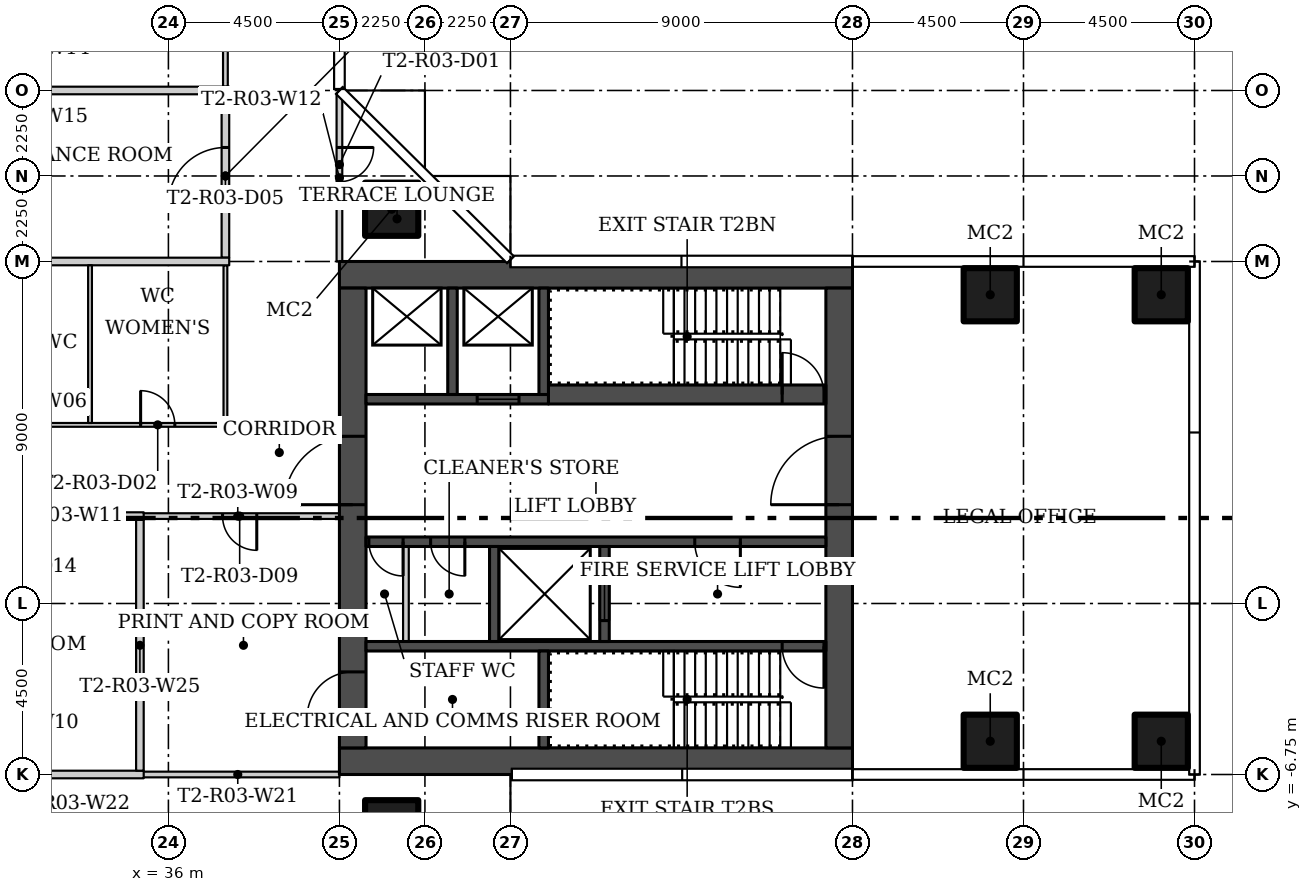
"""IFC4 building model, lengths in metres.
Left out: names, types, materials, properties, quantities, classifications, styles, units other than length and angle.
Written with IfcOpenShell. Run it as: python <this file> out.ifc"""

import sys

from ifc_helpers import new_model, si_unit, direction, frame, frame_2d, origin, origin_2d, place, context, subcontext, project, spatial, rectangle, hollow_rectangle, extrude, element, fill, save


model = new_model("IFC4")
c1 = context("Model", 3, precision=1e-05, world=origin(), true_north=direction((0.0, 1.0)))
c2 = subcontext(c1, "Body", "Model", "MODEL_VIEW")
j1 = project(units=[si_unit("LENGTHUNIT", "METRE"), si_unit("PLANEANGLEUNIT", "RADIAN")], contexts=[c1])
p1 = place(None, origin())
s1 = spatial("IfcSite", under=j1, at=p1, CompositionType="ELEMENT")
p2 = place(p1, origin())
s2 = spatial("IfcBuilding", under=s1, at=p2, CompositionType="ELEMENT")
p3 = place(p2, frame((0.0, 0.0, 42.0)))
s3 = spatial("IfcBuildingStorey", under=s2, at=p3, CompositionType="ELEMENT", Elevation=42.0)
for number, where in (
    (1, (41.875, 8.125, 0.0)),
    (2, (41.875, -8.125, 0.0)),
    (3, (57.625, -5.875, 0.0)),
    (4, (62.125, -5.875, 0.0)),
    (5, (57.625, 5.875, 0.0)),
    (6, (62.125, 5.875, 0.0)),
):
    element("IfcColumn", number, at=place(p3, frame(where)), inside=s3, PredefinedType="COLUMN", context=c2, shape_type="SweptSolid", body=[
        extrude(hollow_rectangle(XDim=1.4, YDim=1.4, WallThickness=0.05, at=origin_2d()), origin(), (0.0, 0.0, 1.0), 3.55),
    ])
p4 = place(p3, frame((37.5, 6.85, 0.0), z_axis=(0.0, 0.0, 1.0), x_axis=(0.0, 1.0, 0.0)))
e7 = element("IfcWall", 7, at=p4, inside=s3, PredefinedType="PARTITIONING", context=c2, shape_type="SweptSolid", body=[
    extrude(rectangle(XDim=4.3, YDim=0.2, at=frame_2d((2.15, 0.0))), origin(), (0.0, 0.0, 1.0), 3.55),
])
p5 = place(p4, frame((1.4, 0.0, 0.0)))
e8 = element("IfcOpeningElement", 8, at=p5, cuts=e7, PredefinedType="OPENING", context=c2, shape_type="SweptSolid", body=[
    extrude(rectangle(XDim=1.5, YDim=2.1, at=frame_2d((0.75, 1.05))), frame((0.0, 0.11, 0.0), z_axis=(0.0, -1.0, 0.0), x_axis=(1.0, 0.0, 0.0)), (0.0, 0.0, 1.0), 0.22),
])
p6 = place(p3, frame((37.5, 11.35, 0.0), z_axis=(0.0, 0.0, 1.0), x_axis=(0.0, 1.0, 0.0)))
e9 = element("IfcWall", 9, at=p6, inside=s3, PredefinedType="PARTITIONING", context=c2, shape_type="SweptSolid", body=[
    extrude(rectangle(XDim=4.325, YDim=0.125, at=frame_2d((2.163, 0.0))), origin(), (0.0, 0.0, 1.0), 3.55),
])
p7 = place(p6, frame((1.7, 0.0, 0.0)))
e10 = element("IfcOpeningElement", 10, at=p7, cuts=e9, PredefinedType="OPENING", context=c2, shape_type="SweptSolid", body=[
    extrude(rectangle(XDim=0.9, YDim=2.1, at=frame_2d((0.45, 1.05))), frame((0.0, 0.073, 0.0), z_axis=(0.0, -1.0, 0.0), x_axis=(1.0, 0.0, 0.0)), (0.0, 0.0, 1.0), 0.145),
])
p8 = place(p3, frame((37.5, 2.5, 0.0), z_axis=(0.0, 0.0, 1.0), x_axis=(0.0, 1.0, 0.0)))
e11 = element("IfcWall", 11, at=p8, inside=s3, PredefinedType="PARTITIONING", context=c2, shape_type="SweptSolid", body=[
    extrude(rectangle(XDim=4.15, YDim=0.1, at=frame_2d((2.075, 0.0))), origin(), (0.0, 0.0, 1.0), 3.55),
])
p9 = place(p3, frame((27.0, 2.45, 0.0)))
e12 = element("IfcWall", 12, at=p9, inside=s3, PredefinedType="PARTITIONING", context=c2, shape_type="SweptSolid", body=[
    extrude(rectangle(XDim=10.55, YDim=0.1, at=frame_2d((5.275, 0.0))), origin(), (0.0, 0.0, 1.0), 3.55),
])
p10 = place(p9, frame((8.269, 0.0, 0.0)))
e13 = element("IfcOpeningElement", 13, at=p10, cuts=e12, PredefinedType="OPENING", context=c2, shape_type="SweptSolid", body=[
    extrude(rectangle(XDim=0.9, YDim=2.1, at=frame_2d((0.45, 1.05))), frame((0.0, 0.06, 0.0), z_axis=(0.0, -1.0, 0.0), x_axis=(1.0, 0.0, 0.0)), (0.0, 0.0, 1.0), 0.12),
])
p11 = place(p9, frame((4.706, 0.0, 0.0)))
e14 = element("IfcOpeningElement", 14, at=p11, cuts=e12, PredefinedType="OPENING", context=c2, shape_type="SweptSolid", body=[
    extrude(rectangle(XDim=0.9, YDim=2.1, at=frame_2d((0.45, 1.05))), frame((0.0, 0.06, 0.0), z_axis=(0.0, -1.0, 0.0), x_axis=(1.0, 0.0, 0.0)), (0.0, 0.0, 1.0), 0.12),
])
p12 = place(p9, frame((1.238, 0.0, 0.0)))
e15 = element("IfcOpeningElement", 15, at=p12, cuts=e12, PredefinedType="OPENING", context=c2, shape_type="SweptSolid", body=[
    extrude(rectangle(XDim=0.9, YDim=2.1, at=frame_2d((0.45, 1.05))), frame((0.0, 0.06, 0.0), z_axis=(0.0, -1.0, 0.0), x_axis=(1.0, 0.0, 0.0)), (0.0, 0.0, 1.0), 0.12),
])
p13 = place(p3, frame((40.5, 0.05, 0.0), z_axis=(0.0, 0.0, 1.0), x_axis=(-1.0, 0.0, 0.0)))
e16 = element("IfcWall", 16, at=p13, inside=s3, PredefinedType="PARTITIONING", context=c2, shape_type="SweptSolid", body=[
    extrude(rectangle(XDim=5.35, YDim=0.15, at=frame_2d((2.675, 0.0))), origin(), (0.0, 0.0, 1.0), 3.55),
])
p14 = place(p13, frame((2.175, 0.0, 0.0)))
e17 = element("IfcOpeningElement", 17, at=p14, cuts=e16, PredefinedType="OPENING", context=c2, shape_type="SweptSolid", body=[
    extrude(rectangle(XDim=0.9, YDim=2.1, at=frame_2d((0.45, 1.05))), frame((0.0, 0.085, 0.0), z_axis=(0.0, -1.0, 0.0), x_axis=(1.0, 0.0, 0.0)), (0.0, 0.0, 1.0), 0.17),
])
p15 = place(p3, frame((35.35, 0.05, 0.0), z_axis=(0.0, 0.0, 1.0), x_axis=(-1.0, 0.0, 0.0)))
e18 = element("IfcWall", 18, at=p15, inside=s3, PredefinedType="PARTITIONING", context=c2, shape_type="SweptSolid", body=[
    extrude(rectangle(XDim=5.45, YDim=0.2, at=frame_2d((2.725, 0.0))), origin(), (0.0, 0.0, 1.0), 3.55),
])
p16 = place(p3, frame((40.5, 11.155, 0.0), z_axis=(0.0, 0.0, 1.0), x_axis=(0.0, -1.0, 0.0)))
e19 = element("IfcWall", 19, at=p16, inside=s3, PredefinedType="PARTITIONING", context=c2, shape_type="SweptSolid", body=[
    extrude(rectangle(XDim=4.405, YDim=0.15, at=frame_2d((2.203, 0.0))), origin(), (0.0, 0.0, 1.0), 3.55),
])
p17 = place(p16, frame((1.405, 0.0, 0.0)))
e20 = element("IfcOpeningElement", 20, at=p17, cuts=e19, PredefinedType="OPENING", context=c2, shape_type="SweptSolid", body=[
    extrude(rectangle(XDim=0.9, YDim=2.1, at=frame_2d((0.45, 1.05))), frame((0.0, 0.085, 0.0), z_axis=(0.0, -1.0, 0.0), x_axis=(1.0, 0.0, 0.0)), (0.0, 0.0, 1.0), 0.17),
])
p18 = place(p3, frame((37.6, 11.25, 0.0), z_axis=(0.0, 0.0, 1.0), x_axis=(-1.0, 0.0, 0.0)))
e21 = element("IfcWall", 21, at=p18, inside=s3, PredefinedType="PARTITIONING", context=c2, shape_type="SweptSolid", body=[
    extrude(rectangle(XDim=10.505, YDim=0.2, at=frame_2d((5.252, 0.0))), origin(), (0.0, 0.0, 1.0), 3.55),
])
p19 = place(p3, frame((27.0, 6.75, 0.0)))
e22 = element("IfcWall", 22, at=p19, inside=s3, PredefinedType="PARTITIONING", context=c2, shape_type="SweptSolid", body=[
    extrude(rectangle(XDim=10.6, YDim=0.2, at=frame_2d((5.3, 0.0))), origin(), (0.0, 0.0, 1.0), 3.55),
])
p20 = place(p3, frame((33.938, 6.65, 0.0), z_axis=(0.0, 0.0, 1.0), x_axis=(0.0, -1.0, 0.0)))
e23 = element("IfcWall", 23, at=p20, inside=s3, PredefinedType="PARTITIONING", context=c2, shape_type="SweptSolid", body=[
    extrude(rectangle(XDim=4.15, YDim=0.1, at=frame_2d((2.075, 0.0))), origin(), (0.0, 0.0, 1.0), 3.55),
])
p21 = place(p3, frame((40.5, -6.75, 0.0), z_axis=(0.0, 0.0, 1.0), x_axis=(-1.0, 0.0, 0.0)))
e24 = element("IfcWall", 24, at=p21, inside=s3, PredefinedType="PARTITIONING", context=c2, shape_type="SweptSolid", body=[
    extrude(rectangle(XDim=5.35, YDim=0.15, at=frame_2d((2.675, 0.0))), origin(), (0.0, 0.0, 1.0), 3.55),
])
p22 = place(p3, frame((35.35, -6.75, 0.0), z_axis=(0.0, 0.0, 1.0), x_axis=(-1.0, 0.0, 0.0)))
e25 = element("IfcWall", 25, at=p22, inside=s3, PredefinedType="PARTITIONING", context=c2, shape_type="SweptSolid", body=[
    extrude(rectangle(XDim=5.45, YDim=0.2, at=frame_2d((2.725, 0.0))), origin(), (0.0, 0.0, 1.0), 3.55),
])
p23 = place(p3, frame((35.25, -0.05, 0.0), z_axis=(0.0, 0.0, 1.0), x_axis=(0.0, -1.0, 0.0)))
e26 = element("IfcWall", 26, at=p23, inside=s3, PredefinedType="PARTITIONING", context=c2, shape_type="SweptSolid", body=[
    extrude(rectangle(XDim=6.6, YDim=0.2, at=frame_2d((3.3, 0.0))), origin(), (0.0, 0.0, 1.0), 3.55),
])
for number, where, z_axis, x_axis in (
    (27, (54.0, -6.4, 0.0), (0.0, 0.0, 1.0), (-1.0, 0.0, 0.0)),
    (28, (54.0, 6.4, 0.0), (0.0, 0.0, 1.0), (-1.0, 0.0, 0.0)),
):
    element("IfcWall", number, at=place(p3, frame(where, z_axis=z_axis, x_axis=x_axis)), inside=s3, PredefinedType="SHEAR", context=c2, shape_type="SweptSolid", body=[
        extrude(rectangle(XDim=13.5, YDim=0.7, at=frame_2d((6.75, 0.0))), origin(), (0.0, 0.0, 1.0), 3.55),
    ])
p24 = place(p3, frame((53.65, -6.05, 0.0), z_axis=(0.0, 0.0, 1.0), x_axis=(0.0, 1.0, 0.0)))
e29 = element("IfcWall", 29, at=p24, inside=s3, PredefinedType="SHEAR", context=c2, shape_type="SweptSolid", body=[
    extrude(rectangle(XDim=12.1, YDim=0.7, at=frame_2d((6.05, 0.0))), origin(), (0.0, 0.0, 1.0), 3.55),
])
p25 = place(p24, frame((6.4, 0.0, 0.0)))
e30 = element("IfcOpeningElement", 30, at=p25, cuts=e29, PredefinedType="OPENING", context=c2, shape_type="SweptSolid", body=[
    extrude(rectangle(XDim=1.8, YDim=2.4, at=frame_2d((0.9, 1.2))), frame((0.0, 0.36, 0.0), z_axis=(0.0, -1.0, 0.0), x_axis=(1.0, 0.0, 0.0)), (0.0, 0.0, 1.0), 0.72),
])
p26 = place(p3, frame((40.85, -6.05, 0.0), z_axis=(0.0, 0.0, 1.0), x_axis=(0.0, 1.0, 0.0)))
e31 = element("IfcWall", 31, at=p26, inside=s3, PredefinedType="SHEAR", context=c2, shape_type="SweptSolid", body=[
    extrude(rectangle(XDim=12.1, YDim=0.7, at=frame_2d((6.05, 0.0))), origin(), (0.0, 0.0, 1.0), 3.55),
])
p27 = place(p26, frame((0.8, 0.0, 0.0)))
e32 = element("IfcOpeningElement", 32, at=p27, cuts=e31, PredefinedType="OPENING", context=c2, shape_type="SweptSolid", body=[
    extrude(rectangle(XDim=1.2, YDim=2.1, at=frame_2d((0.6, 1.05))), frame((0.0, 0.36, 0.0), z_axis=(0.0, -1.0, 0.0), x_axis=(1.0, 0.0, 0.0)), (0.0, 0.0, 1.0), 0.72),
])
p28 = place(p26, frame((6.4, 0.0, 0.0)))
e33 = element("IfcOpeningElement", 33, at=p28, cuts=e31, PredefinedType="OPENING", context=c2, shape_type="SweptSolid", body=[
    extrude(rectangle(XDim=1.8, YDim=2.4, at=frame_2d((0.9, 1.2))), frame((0.0, 0.36, 0.0), z_axis=(0.0, -1.0, 0.0), x_axis=(1.0, 0.0, 0.0)), (0.0, 0.0, 1.0), 0.72),
])
p29 = place(p3, frame((53.3, -3.375, 0.0), z_axis=(0.0, 0.0, 1.0), x_axis=(-1.0, 0.0, 0.0)))
e34 = element("IfcWall", 34, at=p29, inside=s3, PredefinedType="SHEAR", context=c2, shape_type="SweptSolid", body=[
    extrude(rectangle(XDim=12.1, YDim=0.25, at=frame_2d((6.05, 0.0))), origin(), (0.0, 0.0, 1.0), 3.55),
])
p30 = place(p29, frame((0.05, 0.0, 0.0)))
e35 = element("IfcOpeningElement", 35, at=p30, cuts=e34, PredefinedType="OPENING", context=c2, shape_type="SweptSolid", body=[
    extrude(rectangle(XDim=1.1, YDim=2.1, at=frame_2d((0.55, 1.05))), frame((0.0, 0.135, 0.0), z_axis=(0.0, -1.0, 0.0), x_axis=(1.0, 0.0, 0.0)), (0.0, 0.0, 1.0), 0.27),
])
p31 = place(p3, frame((45.875, -6.05, 0.0), z_axis=(0.0, 0.0, 1.0), x_axis=(0.0, 1.0, 0.0)))
e36 = element("IfcWall", 36, at=p31, inside=s3, PredefinedType="SHEAR", context=c2, shape_type="SweptSolid", body=[
    extrude(rectangle(XDim=2.55, YDim=0.25, at=frame_2d((1.275, 0.0))), origin(), (0.0, 0.0, 1.0), 3.55),
])
p32 = place(p3, frame((53.3, -0.625, 0.0), z_axis=(0.0, 0.0, 1.0), x_axis=(-1.0, 0.0, 0.0)))
e37 = element("IfcWall", 37, at=p32, inside=s3, PredefinedType="SHEAR", context=c2, shape_type="SweptSolid", body=[
    extrude(rectangle(XDim=12.1, YDim=0.25, at=frame_2d((6.05, 0.0))), origin(), (0.0, 0.0, 1.0), 3.55),
])
p33 = place(p32, frame((2.25, 0.0, 0.0)))
e38 = element("IfcOpeningElement", 38, at=p33, cuts=e37, PredefinedType="OPENING", context=c2, shape_type="SweptSolid", body=[
    extrude(rectangle(XDim=1.2, YDim=2.1, at=frame_2d((0.6, 1.05))), frame((0.0, 0.135, 0.0), z_axis=(0.0, -1.0, 0.0), x_axis=(1.0, 0.0, 0.0)), (0.0, 0.0, 1.0), 0.27),
])
p34 = place(p32, frame((9.5, 0.0, 0.0)))
e39 = element("IfcOpeningElement", 39, at=p34, cuts=e37, PredefinedType="OPENING", context=c2, shape_type="SweptSolid", body=[
    extrude(rectangle(XDim=0.9, YDim=2.1, at=frame_2d((0.45, 1.05))), frame((0.0, 0.135, 0.0), z_axis=(0.0, -1.0, 0.0), x_axis=(1.0, 0.0, 0.0)), (0.0, 0.0, 1.0), 0.27),
])
p35 = place(p32, frame((11.125, 0.0, 0.0)))
e40 = element("IfcOpeningElement", 40, at=p35, cuts=e37, PredefinedType="OPENING", context=c2, shape_type="SweptSolid", body=[
    extrude(rectangle(XDim=0.9, YDim=2.1, at=frame_2d((0.45, 1.05))), frame((0.0, 0.135, 0.0), z_axis=(0.0, -1.0, 0.0), x_axis=(1.0, 0.0, 0.0)), (0.0, 0.0, 1.0), 0.27),
])
p36 = place(p3, frame((47.475, -3.25, 0.0), z_axis=(0.0, 0.0, 1.0), x_axis=(0.0, 1.0, 0.0)))
e41 = element("IfcWall", 41, at=p36, inside=s3, PredefinedType="SHEAR", context=c2, shape_type="SweptSolid", body=[
    extrude(rectangle(XDim=2.5, YDim=0.25, at=frame_2d((1.25, 0.0))), origin(), (0.0, 0.0, 1.0), 3.55),
])
p37 = place(p36, frame((0.55, 0.0, 0.0)))
e42 = element("IfcOpeningElement", 42, at=p37, cuts=e41, PredefinedType="OPENING", context=c2, shape_type="SweptSolid", body=[
    extrude(rectangle(XDim=1.4, YDim=2.4, at=frame_2d((0.7, 1.2))), frame((0.0, 0.135, 0.0), z_axis=(0.0, -1.0, 0.0), x_axis=(1.0, 0.0, 0.0)), (0.0, 0.0, 1.0), 0.27),
])
p38 = place(p3, frame((44.575, -3.25, 0.0), z_axis=(0.0, 0.0, 1.0), x_axis=(0.0, 1.0, 0.0)))
e43 = element("IfcWall", 43, at=p38, inside=s3, PredefinedType="SHEAR", context=c2, shape_type="SweptSolid", body=[
    extrude(rectangle(XDim=2.5, YDim=0.25, at=frame_2d((1.25, 0.0))), origin(), (0.0, 0.0, 1.0), 3.55),
])
p39 = place(p3, frame((42.25, -3.25, 0.0), z_axis=(0.0, 0.0, 1.0), x_axis=(0.0, 1.0, 0.0)))
e44 = element("IfcWall", 44, at=p39, inside=s3, PredefinedType="PARTITIONING", context=c2, shape_type="SweptSolid", body=[
    extrude(rectangle(XDim=2.5, YDim=0.15, at=frame_2d((1.25, 0.0))), origin(), (0.0, 0.0, 1.0), 3.55),
])
p40 = place(p3, frame((46.0, 3.25, 0.0)))
e45 = element("IfcWall", 45, at=p40, inside=s3, PredefinedType="SHEAR", context=c2, shape_type="SweptSolid", body=[
    extrude(rectangle(XDim=7.3, YDim=0.5, at=frame_2d((3.65, 0.0))), origin(), (0.0, 0.0, 1.0), 3.55),
])
p41 = place(p40, frame((6.15, 0.0, 0.0)))
e46 = element("IfcOpeningElement", 46, at=p41, cuts=e45, PredefinedType="OPENING", context=c2, shape_type="SweptSolid", body=[
    extrude(rectangle(XDim=1.1, YDim=2.1, at=frame_2d((0.55, 1.05))), frame((0.0, 0.26, 0.0), z_axis=(0.0, -1.0, 0.0), x_axis=(1.0, 0.0, 0.0)), (0.0, 0.0, 1.0), 0.52),
])
p42 = place(p3, frame((46.0, 3.125, 0.0), z_axis=(0.0, 0.0, 1.0), x_axis=(-1.0, 0.0, 0.0)))
e47 = element("IfcWall", 47, at=p42, inside=s3, PredefinedType="SHEAR", context=c2, shape_type="SweptSolid", body=[
    extrude(rectangle(XDim=4.8, YDim=0.25, at=frame_2d((2.4, 0.0))), origin(), (0.0, 0.0, 1.0), 3.55),
])
p43 = place(p42, frame((0.775, 0.0, 0.0)))
e48 = element("IfcOpeningElement", 48, at=p43, cuts=e47, PredefinedType="OPENING", context=c2, shape_type="SweptSolid", body=[
    extrude(rectangle(XDim=1.1, YDim=2.1, at=frame_2d((0.55, 1.05))), frame((0.0, 0.135, 0.0), z_axis=(0.0, -1.0, 0.0), x_axis=(1.0, 0.0, 0.0)), (0.0, 0.0, 1.0), 0.27),
])
for number, where, z_axis, x_axis in (
    (49, (45.875, 3.25, 0.0), (0.0, 0.0, 1.0), (0.0, 1.0, 0.0)),
    (50, (43.475, 3.25, 0.0), (0.0, 0.0, 1.0), (0.0, 1.0, 0.0)),
):
    element("IfcWall", number, at=place(p3, frame(where, z_axis=z_axis, x_axis=x_axis)), inside=s3, PredefinedType="SHEAR", context=c2, shape_type="SweptSolid", body=[
        extrude(rectangle(XDim=2.8, YDim=0.25, at=frame_2d((1.4, 0.0))), origin(), (0.0, 0.0, 1.0), 3.55),
    ])
p44 = place(p17, origin())
e51 = element("IfcDoor", 51, at=p44, inside=s3, OperationType="SINGLE_SWING_LEFT", PredefinedType="DOOR", context=c2, shape_type="SweptSolid", body=[
    extrude(rectangle(XDim=0.9, YDim=2.1, at=frame_2d((0.45, 1.05))), frame((0.0, 0.025, 0.0), z_axis=(0.0, -1.0, 0.0), x_axis=(1.0, 0.0, 0.0)), (0.0, 0.0, 1.0), 0.05),
])
fill(e20, e51)
p45 = place(p10, origin())
e52 = element("IfcDoor", 52, at=p45, inside=s3, OperationType="SINGLE_SWING_LEFT", PredefinedType="DOOR", context=c2, shape_type="SweptSolid", body=[
    extrude(rectangle(XDim=0.9, YDim=2.1, at=frame_2d((0.45, 1.05))), frame((0.0, 0.025, 0.0), z_axis=(0.0, -1.0, 0.0), x_axis=(1.0, 0.0, 0.0)), (0.0, 0.0, 1.0), 0.05),
])
fill(e13, e52)
p46 = place(p5, origin())
e53 = element("IfcDoor", 53, at=p46, inside=s3, OperationType="DOUBLE_DOOR_SINGLE_SWING", PredefinedType="DOOR", context=c2, shape_type="SweptSolid", body=[
    extrude(rectangle(XDim=1.5, YDim=2.1, at=frame_2d((0.75, 1.05))), frame((0.0, 0.025, 0.0), z_axis=(0.0, -1.0, 0.0), x_axis=(1.0, 0.0, 0.0)), (0.0, 0.0, 1.0), 0.05),
])
fill(e8, e53)
p47 = place(p14, origin())
e54 = element("IfcDoor", 54, at=p47, inside=s3, OperationType="SINGLE_SWING_LEFT", PredefinedType="DOOR", context=c2, shape_type="SweptSolid", body=[
    extrude(rectangle(XDim=0.9, YDim=2.1, at=frame_2d((0.45, 1.05))), frame((0.0, 0.025, 0.0), z_axis=(0.0, -1.0, 0.0), x_axis=(1.0, 0.0, 0.0)), (0.0, 0.0, 1.0), 0.05),
])
fill(e17, e54)
p48 = place(p25, origin())
e55 = element("IfcDoor", 55, at=p48, inside=s3, OperationType="DOUBLE_DOOR_SINGLE_SWING", PredefinedType="DOOR", context=c2, shape_type="SweptSolid", body=[
    extrude(rectangle(XDim=1.8, YDim=2.4, at=frame_2d((0.9, 1.2))), frame((0.0, 0.025, 0.0), z_axis=(0.0, -1.0, 0.0), x_axis=(1.0, 0.0, 0.0)), (0.0, 0.0, 1.0), 0.05),
])
fill(e30, e55)
p49 = place(p27, origin())
e56 = element("IfcDoor", 56, at=p49, inside=s3, OperationType="SINGLE_SWING_LEFT", PredefinedType="DOOR", context=c2, shape_type="SweptSolid", body=[
    extrude(rectangle(XDim=1.2, YDim=2.1, at=frame_2d((0.6, 1.05))), frame((0.0, 0.025, 0.0), z_axis=(0.0, -1.0, 0.0), x_axis=(1.0, 0.0, 0.0)), (0.0, 0.0, 1.0), 0.05),
])
fill(e32, e56)
p50 = place(p28, origin())
e57 = element("IfcDoor", 57, at=p50, inside=s3, OperationType="DOUBLE_DOOR_SINGLE_SWING", PredefinedType="DOOR", context=c2, shape_type="SweptSolid", body=[
    extrude(rectangle(XDim=1.8, YDim=2.4, at=frame_2d((0.9, 1.2))), frame((0.0, 0.025, 0.0), z_axis=(0.0, -1.0, 0.0), x_axis=(1.0, 0.0, 0.0)), (0.0, 0.0, 1.0), 0.05),
])
fill(e33, e57)
p51 = place(p30, origin())
e58 = element("IfcDoor", 58, at=p51, inside=s3, OperationType="SINGLE_SWING_LEFT", PredefinedType="DOOR", context=c2, shape_type="SweptSolid", body=[
    extrude(rectangle(XDim=1.1, YDim=2.1, at=frame_2d((0.55, 1.05))), frame((0.0, 0.025, 0.0), z_axis=(0.0, -1.0, 0.0), x_axis=(1.0, 0.0, 0.0)), (0.0, 0.0, 1.0), 0.05),
])
fill(e35, e58)
p52 = place(p33, origin())
e59 = element("IfcDoor", 59, at=p52, inside=s3, OperationType="SINGLE_SWING_LEFT", PredefinedType="DOOR", context=c2, shape_type="SweptSolid", body=[
    extrude(rectangle(XDim=1.2, YDim=2.1, at=frame_2d((0.6, 1.05))), frame((0.0, 0.025, 0.0), z_axis=(0.0, -1.0, 0.0), x_axis=(1.0, 0.0, 0.0)), (0.0, 0.0, 1.0), 0.05),
])
fill(e38, e59)
p53 = place(p34, origin())
e60 = element("IfcDoor", 60, at=p53, inside=s3, OperationType="SINGLE_SWING_RIGHT", PredefinedType="DOOR", context=c2, shape_type="SweptSolid", body=[
    extrude(rectangle(XDim=0.9, YDim=2.1, at=frame_2d((0.45, 1.05))), frame((0.0, 0.025, 0.0), z_axis=(0.0, -1.0, 0.0), x_axis=(1.0, 0.0, 0.0)), (0.0, 0.0, 1.0), 0.05),
])
fill(e39, e60)
p54 = place(p35, origin())
e61 = element("IfcDoor", 61, at=p54, inside=s3, OperationType="SINGLE_SWING_RIGHT", PredefinedType="DOOR", context=c2, shape_type="SweptSolid", body=[
    extrude(rectangle(XDim=0.9, YDim=2.1, at=frame_2d((0.45, 1.05))), frame((0.0, 0.025, 0.0), z_axis=(0.0, -1.0, 0.0), x_axis=(1.0, 0.0, 0.0)), (0.0, 0.0, 1.0), 0.05),
])
fill(e40, e61)
p55 = place(p37, origin())
e62 = element("IfcDoor", 62, at=p55, inside=s3, OperationType="SLIDING_TO_LEFT", PredefinedType="DOOR", context=c2, shape_type="SweptSolid", body=[
    extrude(rectangle(XDim=1.4, YDim=2.4, at=frame_2d((0.7, 1.2))), frame((0.0, 0.025, 0.0), z_axis=(0.0, -1.0, 0.0), x_axis=(1.0, 0.0, 0.0)), (0.0, 0.0, 1.0), 0.05),
])
fill(e42, e62)
p56 = place(p41, origin())
e63 = element("IfcDoor", 63, at=p56, inside=s3, OperationType="SINGLE_SWING_RIGHT", PredefinedType="DOOR", context=c2, shape_type="SweptSolid", body=[
    extrude(rectangle(XDim=1.1, YDim=2.1, at=frame_2d((0.55, 1.05))), frame((0.0, 0.025, 0.0), z_axis=(0.0, -1.0, 0.0), x_axis=(1.0, 0.0, 0.0)), (0.0, 0.0, 1.0), 0.05),
])
fill(e46, e63)
p57 = place(p43, origin())
e64 = element("IfcDoor", 64, at=p57, inside=s3, OperationType="SLIDING_TO_LEFT", PredefinedType="DOOR", context=c2, shape_type="SweptSolid", body=[
    extrude(rectangle(XDim=1.1, YDim=2.1, at=frame_2d((0.55, 1.05))), frame((0.0, 0.025, 0.0), z_axis=(0.0, -1.0, 0.0), x_axis=(1.0, 0.0, 0.0)), (0.0, 0.0, 1.0), 0.05),
])
fill(e48, e64)
save(model, sys.argv[1])
